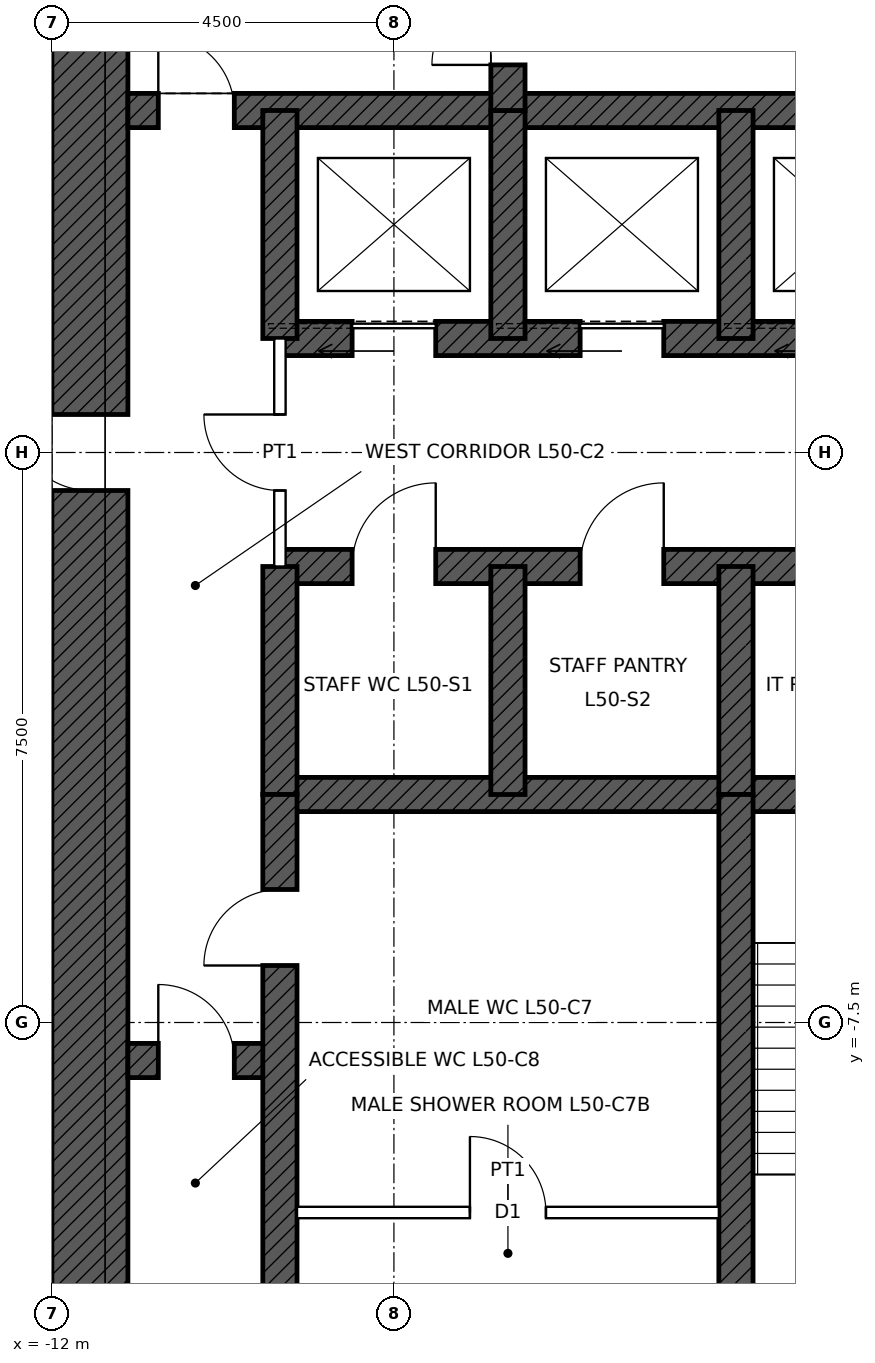
"""IFC4 building model, lengths in metres.
Left out: names, types, materials, properties, quantities, classifications, styles, units other than length and angle.
Written with IfcOpenShell. Run it as: python <this file> out.ifc"""

import sys

from ifc_helpers import new_model, si_unit, direction, frame, frame_2d, origin, place, context, subcontext, project, spatial, rectangle, extrude, element, fill, save


model = new_model("IFC4")
c1 = context("Model", 3, precision=1e-05, world=origin(), true_north=direction((0.0, 1.0)))
c2 = subcontext(c1, "Body", "Model", "MODEL_VIEW")
j1 = project(units=[si_unit("LENGTHUNIT", "METRE"), si_unit("PLANEANGLEUNIT", "RADIAN")], contexts=[c1])
p1 = place(None, origin())
s1 = spatial("IfcSite", under=j1, at=p1, CompositionType="ELEMENT")
p2 = place(p1, origin())
s2 = spatial("IfcBuilding", under=s1, at=p2, CompositionType="ELEMENT")
p3 = place(p2, frame((0.0, 0.0, 233.9)))
s3 = spatial("IfcBuildingStorey", under=s2, at=p3, CompositionType="ELEMENT", Elevation=233.9)
p4 = place(p3, frame((-11.5, -11.0, 0.0), z_axis=(0.0, 0.0, 1.0), x_axis=(0.0, 1.0, 0.0)))
e1 = element("IfcWall", 1, at=p4, inside=s3, PredefinedType="SHEAR", context=c2, shape_type="SweptSolid", body=[
    extrude(rectangle(XDim=22.0, YDim=1.0, at=frame_2d((11.0, 0.0))), origin(), (0.0, 0.0, 1.0), 4.0),
])
p5 = place(p4, frame((10.5, 0.0, 0.0)))
e2 = element("IfcOpeningElement", 2, at=p5, cuts=e1, PredefinedType="OPENING", context=c2, shape_type="SweptSolid", body=[
    extrude(rectangle(XDim=1.0, YDim=2.4, at=frame_2d((0.5, 1.2))), frame((0.0, 0.51, 0.0), z_axis=(0.0, -1.0, 0.0), x_axis=(1.0, 0.0, 0.0)), (0.0, 0.0, 1.0), 1.02),
])
p6 = place(p3, frame((-11.0, 4.5, 0.0), z_axis=(0.0, 0.0, 1.0), x_axis=(1.0, 0.0, 0.0)))
e3 = element("IfcWall", 3, at=p6, inside=s3, PredefinedType="SHEAR", context=c2, shape_type="SweptSolid", body=[
    extrude(rectangle(XDim=22.0, YDim=0.45, at=frame_2d((11.0, 0.0))), origin(), (0.0, 0.0, 1.0), 4.0),
])
p7 = place(p6, frame((0.4, 0.0, 0.0)))
e4 = element("IfcOpeningElement", 4, at=p7, cuts=e3, PredefinedType="OPENING", context=c2, shape_type="SweptSolid", body=[
    extrude(rectangle(XDim=1.0, YDim=2.1, at=frame_2d((0.5, 1.05))), frame((0.0, 0.235, 0.0), z_axis=(0.0, -1.0, 0.0), x_axis=(1.0, 0.0, 0.0)), (0.0, 0.0, 1.0), 0.47),
])
p8 = place(p6, frame((20.6, 0.0, 0.0)))
e5 = element("IfcOpeningElement", 5, at=p8, cuts=e3, PredefinedType="OPENING", context=c2, shape_type="SweptSolid", body=[
    extrude(rectangle(XDim=1.0, YDim=2.1, at=frame_2d((0.5, 1.05))), frame((0.0, 0.235, 0.0), z_axis=(0.0, -1.0, 0.0), x_axis=(1.0, 0.0, 0.0)), (0.0, 0.0, 1.0), 0.47),
])
p9 = place(p3, frame((-9.0, 1.5, 0.0), z_axis=(0.0, 0.0, 1.0), x_axis=(1.0, 0.0, 0.0)))
e6 = element("IfcWall", 6, at=p9, inside=s3, PredefinedType="SHEAR", context=c2, shape_type="SweptSolid", body=[
    extrude(rectangle(XDim=18.0, YDim=0.45, at=frame_2d((9.0, 0.0))), origin(), (0.0, 0.0, 1.0), 4.0),
])
p10 = place(p9, frame((0.95, 0.0, 0.0)))
e7 = element("IfcOpeningElement", 7, at=p10, cuts=e6, PredefinedType="OPENING", context=c2, shape_type="SweptSolid", body=[
    extrude(rectangle(XDim=1.1, YDim=2.1, at=frame_2d((0.55, 1.05))), frame((0.0, 0.235, 0.0), z_axis=(0.0, -1.0, 0.0), x_axis=(1.0, 0.0, 0.0)), (0.0, 0.0, 1.0), 0.47),
])
p11 = place(p9, frame((3.95, 0.0, 0.0)))
e8 = element("IfcOpeningElement", 8, at=p11, cuts=e6, PredefinedType="OPENING", context=c2, shape_type="SweptSolid", body=[
    extrude(rectangle(XDim=1.1, YDim=2.1, at=frame_2d((0.55, 1.05))), frame((0.0, 0.235, 0.0), z_axis=(0.0, -1.0, 0.0), x_axis=(1.0, 0.0, 0.0)), (0.0, 0.0, 1.0), 0.47),
])
p12 = place(p9, frame((6.95, 0.0, 0.0)))
e9 = element("IfcOpeningElement", 9, at=p12, cuts=e6, PredefinedType="OPENING", context=c2, shape_type="SweptSolid", body=[
    extrude(rectangle(XDim=1.1, YDim=2.1, at=frame_2d((0.55, 1.05))), frame((0.0, 0.235, 0.0), z_axis=(0.0, -1.0, 0.0), x_axis=(1.0, 0.0, 0.0)), (0.0, 0.0, 1.0), 0.47),
])
p13 = place(p9, frame((9.95, 0.0, 0.0)))
e10 = element("IfcOpeningElement", 10, at=p13, cuts=e6, PredefinedType="OPENING", context=c2, shape_type="SweptSolid", body=[
    extrude(rectangle(XDim=1.1, YDim=2.1, at=frame_2d((0.55, 1.05))), frame((0.0, 0.235, 0.0), z_axis=(0.0, -1.0, 0.0), x_axis=(1.0, 0.0, 0.0)), (0.0, 0.0, 1.0), 0.47),
])
p14 = place(p9, frame((12.95, 0.0, 0.0)))
e11 = element("IfcOpeningElement", 11, at=p14, cuts=e6, PredefinedType="OPENING", context=c2, shape_type="SweptSolid", body=[
    extrude(rectangle(XDim=1.1, YDim=2.1, at=frame_2d((0.55, 1.05))), frame((0.0, 0.235, 0.0), z_axis=(0.0, -1.0, 0.0), x_axis=(1.0, 0.0, 0.0)), (0.0, 0.0, 1.0), 0.47),
])
p15 = place(p9, frame((15.95, 0.0, 0.0)))
e12 = element("IfcOpeningElement", 12, at=p15, cuts=e6, PredefinedType="OPENING", context=c2, shape_type="SweptSolid", body=[
    extrude(rectangle(XDim=1.1, YDim=2.1, at=frame_2d((0.55, 1.05))), frame((0.0, 0.235, 0.0), z_axis=(0.0, -1.0, 0.0), x_axis=(1.0, 0.0, 0.0)), (0.0, 0.0, 1.0), 0.47),
])
p16 = place(p3, frame((-9.0, -1.5, 0.0), z_axis=(0.0, 0.0, 1.0), x_axis=(1.0, 0.0, 0.0)))
e13 = element("IfcWall", 13, at=p16, inside=s3, PredefinedType="SHEAR", context=c2, shape_type="SweptSolid", body=[
    extrude(rectangle(XDim=18.0, YDim=0.45, at=frame_2d((9.0, 0.0))), origin(), (0.0, 0.0, 1.0), 4.0),
])
p17 = place(p16, frame((0.95, 0.0, 0.0)))
e14 = element("IfcOpeningElement", 14, at=p17, cuts=e13, PredefinedType="OPENING", context=c2, shape_type="SweptSolid", body=[
    extrude(rectangle(XDim=1.1, YDim=2.1, at=frame_2d((0.55, 1.05))), frame((0.0, 0.235, 0.0), z_axis=(0.0, -1.0, 0.0), x_axis=(1.0, 0.0, 0.0)), (0.0, 0.0, 1.0), 0.47),
])
p18 = place(p16, frame((3.95, 0.0, 0.0)))
e15 = element("IfcOpeningElement", 15, at=p18, cuts=e13, PredefinedType="OPENING", context=c2, shape_type="SweptSolid", body=[
    extrude(rectangle(XDim=1.1, YDim=2.1, at=frame_2d((0.55, 1.05))), frame((0.0, 0.235, 0.0), z_axis=(0.0, -1.0, 0.0), x_axis=(1.0, 0.0, 0.0)), (0.0, 0.0, 1.0), 0.47),
])
p19 = place(p16, frame((6.95, 0.0, 0.0)))
e16 = element("IfcOpeningElement", 16, at=p19, cuts=e13, PredefinedType="OPENING", context=c2, shape_type="SweptSolid", body=[
    extrude(rectangle(XDim=1.1, YDim=2.1, at=frame_2d((0.55, 1.05))), frame((0.0, 0.235, 0.0), z_axis=(0.0, -1.0, 0.0), x_axis=(1.0, 0.0, 0.0)), (0.0, 0.0, 1.0), 0.47),
])
p20 = place(p3, frame((-9.0, -4.5, 0.0), z_axis=(0.0, 0.0, 1.0), x_axis=(1.0, 0.0, 0.0)))
e17 = element("IfcWall", 17, at=p20, inside=s3, PredefinedType="SHEAR", context=c2, shape_type="SweptSolid", body=[
    extrude(rectangle(XDim=18.0, YDim=0.45, at=frame_2d((9.0, 0.0))), origin(), (0.0, 0.0, 1.0), 4.0),
])
p21 = place(p3, frame((-11.0, -8.0, 0.0), z_axis=(0.0, 0.0, 1.0), x_axis=(1.0, 0.0, 0.0)))
e18 = element("IfcWall", 18, at=p21, inside=s3, PredefinedType="SHEAR", context=c2, shape_type="SweptSolid", body=[
    extrude(rectangle(XDim=2.0, YDim=0.45, at=frame_2d((1.0, 0.0))), origin(), (0.0, 0.0, 1.0), 4.0),
])
p22 = place(p21, frame((0.4, 0.0, 0.0)))
e19 = element("IfcOpeningElement", 19, at=p22, cuts=e18, PredefinedType="OPENING", context=c2, shape_type="SweptSolid", body=[
    extrude(rectangle(XDim=1.0, YDim=2.1, at=frame_2d((0.5, 1.05))), frame((0.0, 0.235, 0.0), z_axis=(0.0, -1.0, 0.0), x_axis=(1.0, 0.0, 0.0)), (0.0, 0.0, 1.0), 0.47),
])
for number, where, z_axis, x_axis in (
    (20, (-9.0, 1.5, 0.0), (0.0, 0.0, 1.0), (0.0, 1.0, 0.0)),
    (21, (-9.0, -4.5, 0.0), (0.0, 0.0, 1.0), (0.0, 1.0, 0.0)),
    (22, (-6.0, 1.5, 0.0), (0.0, 0.0, 1.0), (0.0, 1.0, 0.0)),
    (23, (-3.0, 1.5, 0.0), (0.0, 0.0, 1.0), (0.0, 1.0, 0.0)),
    (24, (-6.0, -4.5, 0.0), (0.0, 0.0, 1.0), (0.0, 1.0, 0.0)),
    (25, (-3.0, -4.5, 0.0), (0.0, 0.0, 1.0), (0.0, 1.0, 0.0)),
):
    element("IfcWall", number, at=place(p3, frame(where, z_axis=z_axis, x_axis=x_axis)), inside=s3, PredefinedType="SHEAR", context=c2, shape_type="SweptSolid", body=[
        extrude(rectangle(XDim=3.0, YDim=0.45, at=frame_2d((1.5, 0.0))), origin(), (0.0, 0.0, 1.0), 4.0),
    ])
p23 = place(p3, frame((-6.0, 4.5, 0.0), z_axis=(0.0, 0.0, 1.0), x_axis=(0.0, 1.0, 0.0)))
e26 = element("IfcWall", 26, at=p23, inside=s3, PredefinedType="SHEAR", context=c2, shape_type="SweptSolid", body=[
    extrude(rectangle(XDim=6.5, YDim=0.45, at=frame_2d((3.25, 0.0))), origin(), (0.0, 0.0, 1.0), 4.0),
])
p24 = place(p23, frame((0.6, 0.0, 0.0)))
e27 = element("IfcOpeningElement", 27, at=p24, cuts=e26, PredefinedType="OPENING", context=c2, shape_type="SweptSolid", body=[
    extrude(rectangle(XDim=1.0, YDim=2.1, at=frame_2d((0.5, 1.05))), frame((0.0, 0.235, 0.0), z_axis=(0.0, -1.0, 0.0), x_axis=(1.0, 0.0, 0.0)), (0.0, 0.0, 1.0), 0.47),
])
p25 = place(p3, frame((-9.0, -11.0, 0.0), z_axis=(0.0, 0.0, 1.0), x_axis=(0.0, 1.0, 0.0)))
e28 = element("IfcWall", 28, at=p25, inside=s3, PredefinedType="SHEAR", context=c2, shape_type="SweptSolid", body=[
    extrude(rectangle(XDim=6.5, YDim=0.45, at=frame_2d((3.25, 0.0))), origin(), (0.0, 0.0, 1.0), 4.0),
])
p26 = place(p25, frame((4.25, 0.0, 0.0)))
e29 = element("IfcOpeningElement", 29, at=p26, cuts=e28, PredefinedType="OPENING", context=c2, shape_type="SweptSolid", body=[
    extrude(rectangle(XDim=1.0, YDim=2.1, at=frame_2d((0.5, 1.05))), frame((0.0, 0.235, 0.0), z_axis=(0.0, -1.0, 0.0), x_axis=(1.0, 0.0, 0.0)), (0.0, 0.0, 1.0), 0.47),
])
p27 = place(p3, frame((-3.0, -11.0, 0.0), z_axis=(0.0, 0.0, 1.0), x_axis=(0.0, 1.0, 0.0)))
e30 = element("IfcWall", 30, at=p27, inside=s3, PredefinedType="SHEAR", context=c2, shape_type="SweptSolid", body=[
    extrude(rectangle(XDim=6.5, YDim=0.45, at=frame_2d((3.25, 0.0))), origin(), (0.0, 0.0, 1.0), 4.0),
])
p28 = place(p3, frame((-8.775, -10.0, 0.0), z_axis=(0.0, 0.0, 1.0), x_axis=(1.0, 0.0, 0.0)))
e31 = element("IfcWall", 31, at=p28, inside=s3, PredefinedType="PARTITIONING", context=c2, shape_type="SweptSolid", body=[
    extrude(rectangle(XDim=5.55, YDim=0.15, at=frame_2d((2.775, 0.0))), origin(), (0.0, 0.0, 1.0), 3.75),
])
p29 = place(p28, frame((2.275, 0.0, 0.0)))
e32 = element("IfcOpeningElement", 32, at=p29, cuts=e31, PredefinedType="OPENING", context=c2, shape_type="SweptSolid", body=[
    extrude(rectangle(XDim=1.0, YDim=2.1, at=frame_2d((0.5, 1.05))), frame((0.0, 0.085, 0.0), z_axis=(0.0, -1.0, 0.0), x_axis=(1.0, 0.0, 0.0)), (0.0, 0.0, 1.0), 0.17),
])
p30 = place(p3, frame((-9.0, -1.5, 0.0), z_axis=(0.0, 0.0, 1.0), x_axis=(0.0, 1.0, 0.0)))
e33 = element("IfcWall", 33, at=p30, inside=s3, PredefinedType="PARTITIONING", context=c2, shape_type="SweptSolid", body=[
    extrude(rectangle(XDim=3.0, YDim=0.15, at=frame_2d((1.5, 0.0))), origin(), (0.0, 0.0, 1.0), 3.75),
])
p31 = place(p30, frame((1.0, 0.0, 0.0)))
e34 = element("IfcOpeningElement", 34, at=p31, cuts=e33, PredefinedType="OPENING", context=c2, shape_type="SweptSolid", body=[
    extrude(rectangle(XDim=1.0, YDim=2.4, at=frame_2d((0.5, 1.2))), frame((0.0, 0.085, 0.0), z_axis=(0.0, -1.0, 0.0), x_axis=(1.0, 0.0, 0.0)), (0.0, 0.0, 1.0), 0.17),
])
p32 = place(p7, origin())
e35 = element("IfcDoor", 35, at=p32, inside=s3, OperationType="SINGLE_SWING_LEFT", PredefinedType="DOOR", context=c2, shape_type="SweptSolid", body=[
    extrude(rectangle(XDim=1.0, YDim=2.1, at=frame_2d((0.5, 1.05))), frame((0.0, 0.025, 0.0), z_axis=(0.0, -1.0, 0.0), x_axis=(1.0, 0.0, 0.0)), (0.0, 0.0, 1.0), 0.05),
])
fill(e4, e35)
p33 = place(p24, origin())
e36 = element("IfcDoor", 36, at=p33, inside=s3, OperationType="SINGLE_SWING_LEFT", PredefinedType="DOOR", context=c2, shape_type="SweptSolid", body=[
    extrude(rectangle(XDim=1.0, YDim=2.1, at=frame_2d((0.5, 1.05))), frame((0.0, 0.025, 0.0), z_axis=(0.0, -1.0, 0.0), x_axis=(1.0, 0.0, 0.0)), (0.0, 0.0, 1.0), 0.05),
])
fill(e27, e36)
p34 = place(p5, origin())
e37 = element("IfcDoor", 37, at=p34, inside=s3, OperationType="SINGLE_SWING_RIGHT", PredefinedType="DOOR", context=c2, shape_type="SweptSolid", body=[
    extrude(rectangle(XDim=1.0, YDim=2.4, at=frame_2d((0.5, 1.2))), frame((0.0, 0.485, 0.0), z_axis=(0.0, -1.0, 0.0), x_axis=(1.0, 0.0, 0.0)), (0.0, 0.0, 1.0), 0.05),
])
fill(e2, e37)
p35 = place(p26, origin())
e38 = element("IfcDoor", 38, at=p35, inside=s3, OperationType="SINGLE_SWING_LEFT", PredefinedType="DOOR", context=c2, shape_type="SweptSolid", body=[
    extrude(rectangle(XDim=1.0, YDim=2.1, at=frame_2d((0.5, 1.05))), frame((0.0, 0.025, 0.0), z_axis=(0.0, -1.0, 0.0), x_axis=(1.0, 0.0, 0.0)), (0.0, 0.0, 1.0), 0.05),
])
fill(e29, e38)
p36 = place(p22, origin())
e39 = element("IfcDoor", 39, at=p36, inside=s3, OperationType="SINGLE_SWING_LEFT", PredefinedType="DOOR", context=c2, shape_type="SweptSolid", body=[
    extrude(rectangle(XDim=1.0, YDim=2.1, at=frame_2d((0.5, 1.05))), frame((0.0, 0.025, 0.0), z_axis=(0.0, -1.0, 0.0), x_axis=(1.0, 0.0, 0.0)), (0.0, 0.0, 1.0), 0.05),
])
fill(e19, e39)
p37 = place(p10, origin())
e40 = element("IfcDoor", 40, at=p37, inside=s3, OperationType="SLIDING_TO_LEFT", PredefinedType="DOOR", context=c2, shape_type="SweptSolid", body=[
    extrude(rectangle(XDim=1.1, YDim=2.1, at=frame_2d((0.55, 1.05))), frame((0.0, 0.025, 0.0), z_axis=(0.0, -1.0, 0.0), x_axis=(1.0, 0.0, 0.0)), (0.0, 0.0, 1.0), 0.05),
])
fill(e7, e40)
p38 = place(p11, origin())
e41 = element("IfcDoor", 41, at=p38, inside=s3, OperationType="SLIDING_TO_LEFT", PredefinedType="DOOR", context=c2, shape_type="SweptSolid", body=[
    extrude(rectangle(XDim=1.1, YDim=2.1, at=frame_2d((0.55, 1.05))), frame((0.0, 0.025, 0.0), z_axis=(0.0, -1.0, 0.0), x_axis=(1.0, 0.0, 0.0)), (0.0, 0.0, 1.0), 0.05),
])
fill(e8, e41)
p39 = place(p29, origin())
e42 = element("IfcDoor", 42, at=p39, inside=s3, OperationType="SINGLE_SWING_LEFT", PredefinedType="DOOR", context=c2, shape_type="SweptSolid", body=[
    extrude(rectangle(XDim=1.0, YDim=2.1, at=frame_2d((0.5, 1.05))), frame((0.0, 0.025, 0.0), z_axis=(0.0, -1.0, 0.0), x_axis=(1.0, 0.0, 0.0)), (0.0, 0.0, 1.0), 0.05),
])
fill(e32, e42)
p40 = place(p31, origin())
e43 = element("IfcDoor", 43, at=p40, inside=s3, OperationType="SINGLE_SWING_RIGHT", PredefinedType="DOOR", context=c2, shape_type="SweptSolid", body=[
    extrude(rectangle(XDim=1.0, YDim=2.4, at=frame_2d((0.5, 1.2))), frame((0.0, 0.025, 0.0), z_axis=(0.0, -1.0, 0.0), x_axis=(1.0, 0.0, 0.0)), (0.0, 0.0, 1.0), 0.05),
])
fill(e34, e43)
p41 = place(p17, origin())
e44 = element("IfcDoor", 44, at=p41, inside=s3, OperationType="SINGLE_SWING_RIGHT", PredefinedType="DOOR", context=c2, shape_type="SweptSolid", body=[
    extrude(rectangle(XDim=1.1, YDim=2.1, at=frame_2d((0.55, 1.05))), frame((0.0, 0.025, 0.0), z_axis=(0.0, -1.0, 0.0), x_axis=(1.0, 0.0, 0.0)), (0.0, 0.0, 1.0), 0.05),
])
fill(e14, e44)
p42 = place(p18, origin())
e45 = element("IfcDoor", 45, at=p42, inside=s3, OperationType="SINGLE_SWING_RIGHT", PredefinedType="DOOR", context=c2, shape_type="SweptSolid", body=[
    extrude(rectangle(XDim=1.1, YDim=2.1, at=frame_2d((0.55, 1.05))), frame((0.0, 0.025, 0.0), z_axis=(0.0, -1.0, 0.0), x_axis=(1.0, 0.0, 0.0)), (0.0, 0.0, 1.0), 0.05),
])
fill(e15, e45)
save(model, sys.argv[1])
